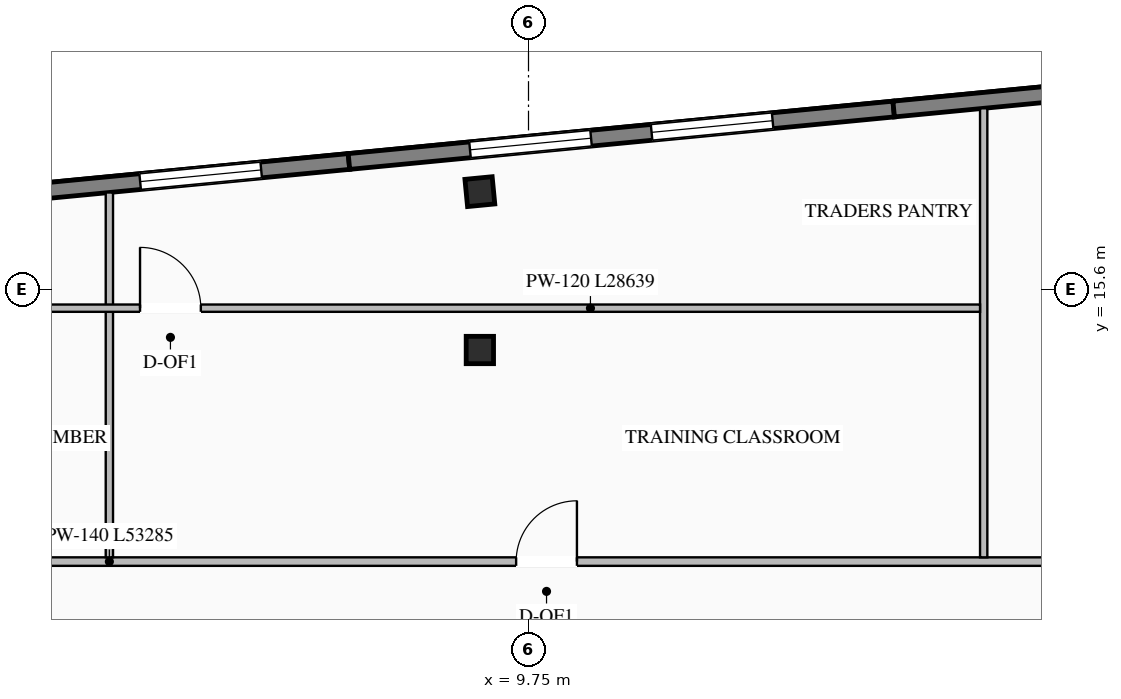
"""IFC4 building model, lengths in metres.
Left out: names, types, materials, properties, quantities, classifications, styles, units other than length and angle.
Written with IfcOpenShell. Run it as: python <this file> out.ifc"""

import sys

from ifc_helpers import new_model, si_unit, direction, frame, frame_2d, origin, origin_2d, place, context, subcontext, project, spatial, rectangle, i_section, extrude, element, fill, save


model = new_model("IFC4")
c1 = context("Model", 3, precision=1e-05, world=origin(), true_north=direction((0.0, 1.0)))
c2 = subcontext(c1, "Body", "Model", "MODEL_VIEW")
j1 = project(units=[si_unit("LENGTHUNIT", "METRE"), si_unit("PLANEANGLEUNIT", "RADIAN")], contexts=[c1])
p1 = place(None, origin())
s1 = spatial("IfcSite", under=j1, at=p1, CompositionType="ELEMENT")
p2 = place(p1, origin())
s2 = spatial("IfcBuilding", under=s1, at=p2, CompositionType="ELEMENT")
p3 = place(p2, frame((0.0, 0.0, 272.4)))
s3 = spatial("IfcBuildingStorey", under=s2, at=p3, CompositionType="ELEMENT", Elevation=272.4)
for number, where, z_axis, x_axis in (
    (1, (8.95, 14.6, 0.0), (0.0, 0.0, 1.0), (1.0, 0.0, 0.0)),
    (2, (8.95, 17.205, 0.0), (0.0, 0.0, 1.0), (0.995, 0.096, 0.0)),
):
    element("IfcColumn", number, at=place(p3, frame(where, z_axis=z_axis, x_axis=x_axis)), inside=s3, PredefinedType="COLUMN", context=c2, shape_type="SweptSolid", body=[
        extrude(i_section(OverallWidth=0.45, OverallDepth=0.45, WebThickness=0.022, FlangeThickness=0.032, at=origin_2d()), origin(), (0.0, 0.0, 1.0), 3.45),
    ])
p4 = place(p3, frame((-2.161, 16.838, 0.0), z_axis=(0.0, 0.0, 1.0), x_axis=(0.995396794462, 0.09583956164, 0.0)))
e3 = element("IfcWall", 3, at=p4, inside=s3, PredefinedType="STANDARD", context=c2, shape_type="SweptSolid", body=[
    extrude(rectangle(XDim=9.0, YDim=0.26, at=frame_2d((4.5, 0.0))), origin(), (0.0, 0.0, 1.0), 3.25),
])
p5 = place(p4, frame((2.0, 0.0, 0.76)))
e4 = element("IfcOpeningElement", 4, at=p5, cuts=e3, PredefinedType="OPENING", context=c2, shape_type="SweptSolid", body=[
    extrude(rectangle(XDim=2.0, YDim=2.05, at=frame_2d((1.0, 1.025))), frame((0.0, 0.14, 0.0), z_axis=(0.0, -1.0, 0.0), x_axis=(1.0, 0.0, 0.0)), (0.0, 0.0, 1.0), 0.28),
])
p6 = place(p4, frame((5.55, 0.0, 0.76)))
e5 = element("IfcOpeningElement", 5, at=p6, cuts=e3, PredefinedType="OPENING", context=c2, shape_type="SweptSolid", body=[
    extrude(rectangle(XDim=2.0, YDim=2.05, at=frame_2d((1.0, 1.025))), frame((0.0, 0.14, 0.0), z_axis=(0.0, -1.0, 0.0), x_axis=(1.0, 0.0, 0.0)), (0.0, 0.0, 1.0), 0.28),
])
p7 = place(p3, frame((6.797, 17.7, 0.0), z_axis=(0.0, 0.0, 1.0), x_axis=(0.995394455533, 0.09586385082, 0.0)))
e6 = element("IfcWall", 6, at=p7, inside=s3, PredefinedType="STANDARD", context=c2, shape_type="SweptSolid", body=[
    extrude(rectangle(XDim=9.0, YDim=0.26, at=frame_2d((4.5, 0.0))), origin(), (0.0, 0.0, 1.0), 3.25),
])
p8 = place(p7, frame((2.0, 0.0, 0.76)))
e7 = element("IfcOpeningElement", 7, at=p8, cuts=e6, PredefinedType="OPENING", context=c2, shape_type="SweptSolid", body=[
    extrude(rectangle(XDim=2.0, YDim=2.05, at=frame_2d((1.0, 1.025))), frame((0.0, 0.14, 0.0), z_axis=(0.0, -1.0, 0.0), x_axis=(1.0, 0.0, 0.0)), (0.0, 0.0, 1.0), 0.28),
])
p9 = place(p7, frame((5.0, 0.0, 0.76)))
e8 = element("IfcOpeningElement", 8, at=p9, cuts=e6, PredefinedType="OPENING", context=c2, shape_type="SweptSolid", body=[
    extrude(rectangle(XDim=2.0, YDim=2.05, at=frame_2d((1.0, 1.025))), frame((0.0, 0.14, 0.0), z_axis=(0.0, -1.0, 0.0), x_axis=(1.0, 0.0, 0.0)), (0.0, 0.0, 1.0), 0.28),
])
p10 = place(p3, frame((15.756, 18.563, 0.0), z_axis=(0.0, 0.0, 1.0), x_axis=(0.995396745868, 0.095840066339, 0.0)))
e9 = element("IfcWall", 9, at=p10, inside=s3, PredefinedType="STANDARD", context=c2, shape_type="SweptSolid", body=[
    extrude(rectangle(XDim=10.75, YDim=0.26, at=frame_2d((5.375, 0.0))), origin(), (0.0, 0.0, 1.0), 3.25),
])
p11 = place(p10, frame((2.583, 0.0, 0.76)))
e10 = element("IfcOpeningElement", 10, at=p11, cuts=e9, PredefinedType="OPENING", context=c2, shape_type="SweptSolid", body=[
    extrude(rectangle(XDim=2.0, YDim=2.05, at=frame_2d((1.0, 1.025))), frame((0.0, 0.14, 0.0), z_axis=(0.0, -1.0, 0.0), x_axis=(1.0, 0.0, 0.0)), (0.0, 0.0, 1.0), 0.28),
])
p12 = place(p10, frame((6.167, 0.0, 0.76)))
e11 = element("IfcOpeningElement", 11, at=p12, cuts=e9, PredefinedType="OPENING", context=c2, shape_type="SweptSolid", body=[
    extrude(rectangle(XDim=2.0, YDim=2.05, at=frame_2d((1.0, 1.025))), frame((0.0, 0.14, 0.0), z_axis=(0.0, -1.0, 0.0), x_axis=(1.0, 0.0, 0.0)), (0.0, 0.0, 1.0), 0.28),
])
p13 = place(p3, frame((-23.733, 11.12, 0.0), z_axis=(0.0, 0.0, 1.0), x_axis=(1.0, 0.0, 0.0)))
e12 = element("IfcWall", 12, at=p13, inside=s3, PredefinedType="STANDARD", context=c2, shape_type="SweptSolid", body=[
    extrude(rectangle(XDim=53.285, YDim=0.14, at=frame_2d((26.643, 0.0))), origin(), (0.0, 0.0, 1.0), 3.25),
])
p14 = place(p13, frame((5.731, 0.0, 0.0)))
e13 = element("IfcOpeningElement", 13, at=p14, cuts=e12, PredefinedType="OPENING", context=c2, shape_type="SweptSolid", body=[
    extrude(rectangle(XDim=1.0, YDim=2.08, at=frame_2d((0.5, 1.04))), frame((0.0, 0.08, 0.0), z_axis=(0.0, -1.0, 0.0), x_axis=(1.0, 0.0, 0.0)), (0.0, 0.0, 1.0), 0.16),
])
p15 = place(p13, frame((18.9, 0.0, 0.0)))
e14 = element("IfcOpeningElement", 14, at=p15, cuts=e12, PredefinedType="OPENING", context=c2, shape_type="SweptSolid", body=[
    extrude(rectangle(XDim=1.0, YDim=2.08, at=frame_2d((0.5, 1.04))), frame((0.0, 0.08, 0.0), z_axis=(0.0, -1.0, 0.0), x_axis=(1.0, 0.0, 0.0)), (0.0, 0.0, 1.0), 0.16),
])
p16 = place(p13, frame((33.279, 0.0, 0.0)))
e15 = element("IfcOpeningElement", 15, at=p16, cuts=e12, PredefinedType="OPENING", context=c2, shape_type="SweptSolid", body=[
    extrude(rectangle(XDim=1.0, YDim=2.08, at=frame_2d((0.5, 1.04))), frame((0.0, 0.08, 0.0), z_axis=(0.0, -1.0, 0.0), x_axis=(1.0, 0.0, 0.0)), (0.0, 0.0, 1.0), 0.16),
])
p17 = place(p13, frame((46.501, 0.0, 0.0)))
e16 = element("IfcOpeningElement", 16, at=p17, cuts=e12, PredefinedType="OPENING", context=c2, shape_type="SweptSolid", body=[
    extrude(rectangle(XDim=1.0, YDim=2.08, at=frame_2d((0.5, 1.04))), frame((0.0, 0.08, 0.0), z_axis=(0.0, -1.0, 0.0), x_axis=(1.0, 0.0, 0.0)), (0.0, 0.0, 1.0), 0.16),
])
p18 = place(p3, frame((2.857, 11.19, 0.0), z_axis=(0.0, 0.0, 1.0), x_axis=(0.0, 1.0, 0.0)))
e17 = element("IfcWall", 17, at=p18, inside=s3, PredefinedType="STANDARD", context=c2, shape_type="SweptSolid", body=[
    extrude(rectangle(XDim=6.0, YDim=0.12, at=frame_2d((3.0, 0.0))), origin(), (0.0, 0.0, 1.0), 3.25),
])
p19 = place(p3, frame((17.236, 11.19, 0.0), z_axis=(0.0, 0.0, 1.0), x_axis=(0.0, 1.0, 0.0)))
e18 = element("IfcWall", 18, at=p19, inside=s3, PredefinedType="STANDARD", context=c2, shape_type="SweptSolid", body=[
    extrude(rectangle(XDim=7.385, YDim=0.12, at=frame_2d((3.693, 0.0))), origin(), (0.0, 0.0, 1.0), 3.25),
])
p20 = place(p3, frame((-11.463, 15.288, 0.0), z_axis=(0.0, 0.0, 1.0), x_axis=(1.0, 0.0, 0.0)))
e19 = element("IfcWall", 19, at=p20, inside=s3, PredefinedType="STANDARD", context=c2, shape_type="SweptSolid", body=[
    extrude(rectangle(XDim=28.639, YDim=0.12, at=frame_2d((14.319, 0.0))), origin(), (0.0, 0.0, 1.0), 2.565),
])
p21 = place(p20, frame((6.787, 0.0, 0.0)))
e20 = element("IfcOpeningElement", 20, at=p21, cuts=e19, PredefinedType="OPENING", context=c2, shape_type="SweptSolid", body=[
    extrude(rectangle(XDim=1.0, YDim=2.08, at=frame_2d((0.5, 1.04))), frame((0.0, 0.07, 0.0), z_axis=(0.0, -1.0, 0.0), x_axis=(1.0, 0.0, 0.0)), (0.0, 0.0, 1.0), 0.14),
])
p22 = place(p20, frame((14.824, 0.0, 0.0)))
e21 = element("IfcOpeningElement", 21, at=p22, cuts=e19, PredefinedType="OPENING", context=c2, shape_type="SweptSolid", body=[
    extrude(rectangle(XDim=1.0, YDim=2.08, at=frame_2d((0.5, 1.04))), frame((0.0, 0.07, 0.0), z_axis=(0.0, -1.0, 0.0), x_axis=(1.0, 0.0, 0.0)), (0.0, 0.0, 1.0), 0.14),
])
p23 = place(p6, origin())
e22 = element("IfcWindow", 22, at=p23, inside=s3, PartitioningType="DOUBLE_PANEL_VERTICAL", PredefinedType="WINDOW", context=c2, shape_type="SweptSolid", body=[
    extrude(rectangle(XDim=2.0, YDim=2.05, at=frame_2d((1.0, 1.025))), frame((0.0, 0.03, 0.0), z_axis=(0.0, -1.0, 0.0), x_axis=(1.0, 0.0, 0.0)), (0.0, 0.0, 1.0), 0.06),
])
fill(e5, e22)
p24 = place(p8, origin())
e23 = element("IfcWindow", 23, at=p24, inside=s3, PartitioningType="DOUBLE_PANEL_VERTICAL", PredefinedType="WINDOW", context=c2, shape_type="SweptSolid", body=[
    extrude(rectangle(XDim=2.0, YDim=2.05, at=frame_2d((1.0, 1.025))), frame((0.0, 0.03, 0.0), z_axis=(0.0, -1.0, 0.0), x_axis=(1.0, 0.0, 0.0)), (0.0, 0.0, 1.0), 0.06),
])
fill(e7, e23)
p25 = place(p9, origin())
e24 = element("IfcWindow", 24, at=p25, inside=s3, PartitioningType="DOUBLE_PANEL_VERTICAL", PredefinedType="WINDOW", context=c2, shape_type="SweptSolid", body=[
    extrude(rectangle(XDim=2.0, YDim=2.05, at=frame_2d((1.0, 1.025))), frame((0.0, 0.03, 0.0), z_axis=(0.0, -1.0, 0.0), x_axis=(1.0, 0.0, 0.0)), (0.0, 0.0, 1.0), 0.06),
])
fill(e8, e24)
p26 = place(p16, origin())
e25 = element("IfcDoor", 25, at=p26, inside=s3, OperationType="SINGLE_SWING_RIGHT", PredefinedType="DOOR", context=c2, shape_type="SweptSolid", body=[
    extrude(rectangle(XDim=1.0, YDim=2.08, at=frame_2d((0.5, 1.04))), frame((0.0, 0.025, 0.0), z_axis=(0.0, -1.0, 0.0), x_axis=(1.0, 0.0, 0.0)), (0.0, 0.0, 1.0), 0.05),
])
fill(e15, e25)
p27 = place(p22, origin())
e26 = element("IfcDoor", 26, at=p27, inside=s3, OperationType="SINGLE_SWING_LEFT", PredefinedType="DOOR", context=c2, shape_type="SweptSolid", body=[
    extrude(rectangle(XDim=1.0, YDim=2.08, at=frame_2d((0.5, 1.04))), frame((0.0, 0.025, 0.0), z_axis=(0.0, -1.0, 0.0), x_axis=(1.0, 0.0, 0.0)), (0.0, 0.0, 1.0), 0.05),
])
fill(e21, e26)
save(model, sys.argv[1])
